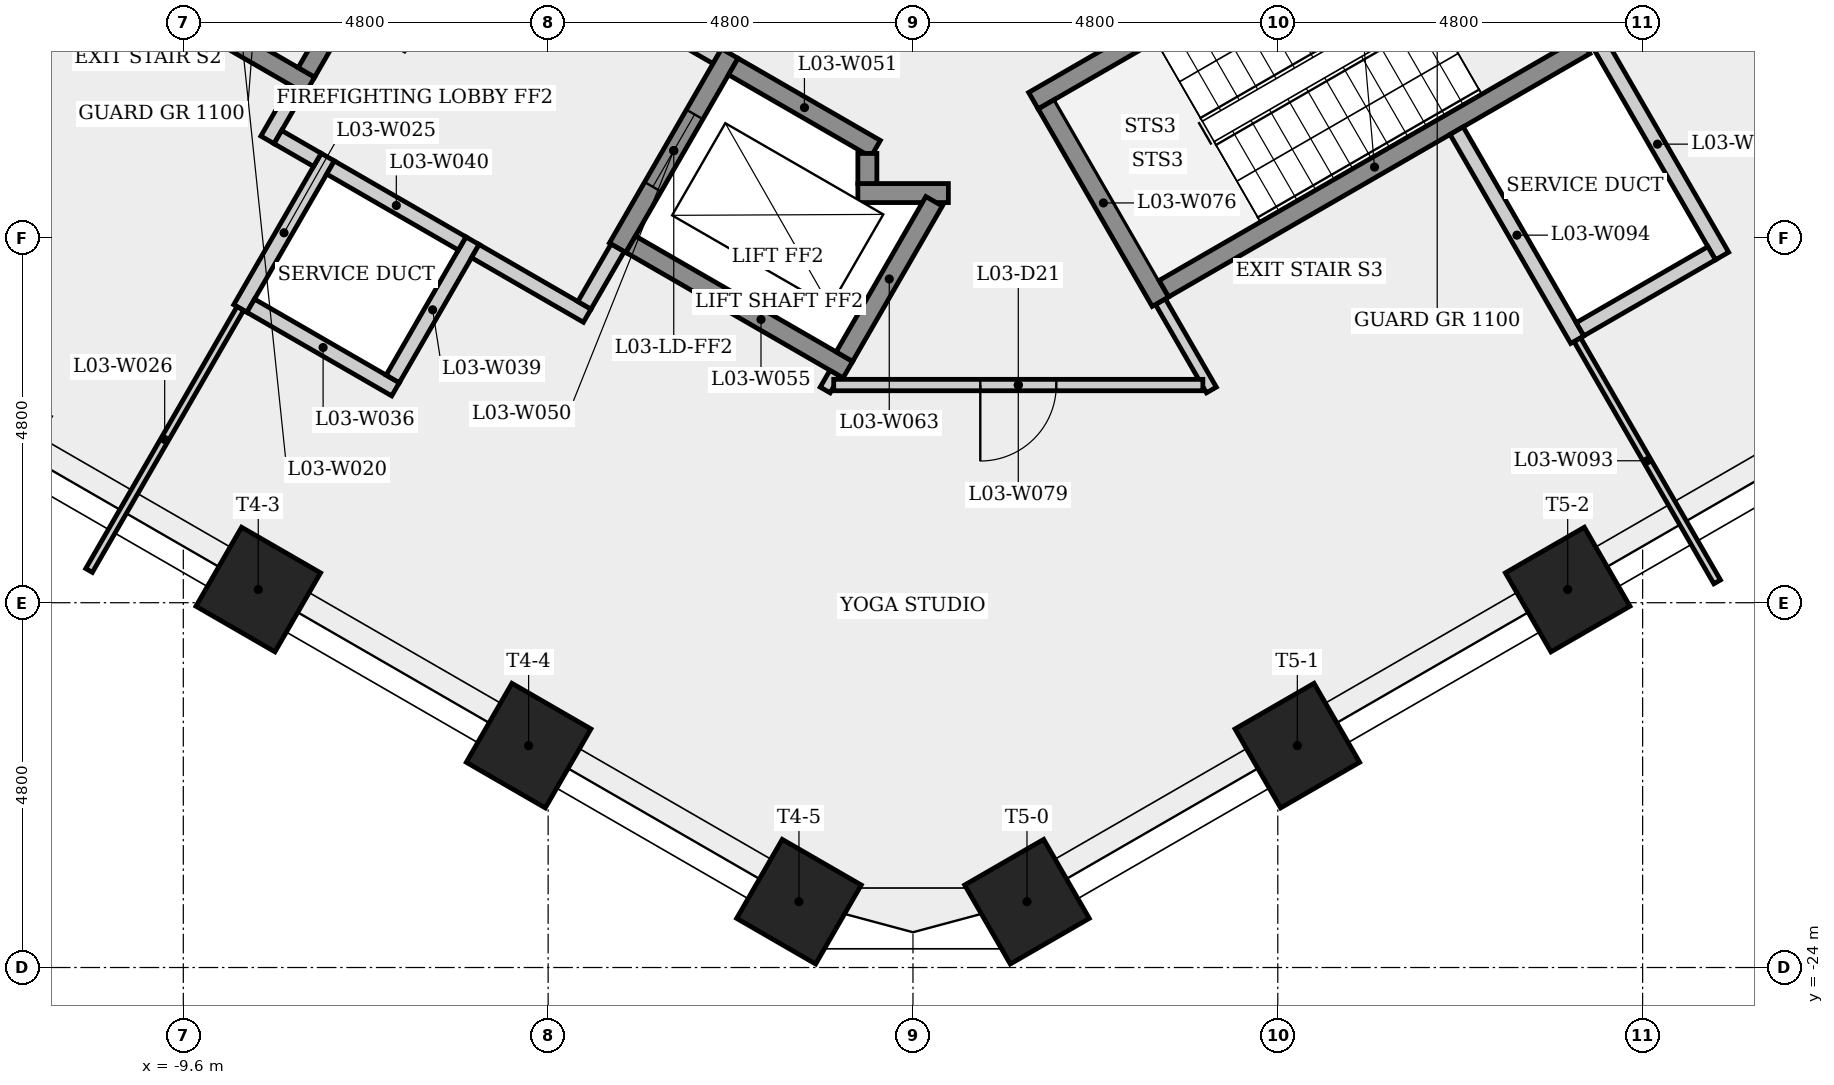
"""IFC4 building model, lengths in metres.
Left out: names, types, materials, properties, quantities, classifications, styles, units other than length and angle.
Written with IfcOpenShell. Run it as: python <this file> out.ifc"""

import sys

from ifc_helpers import new_model, si_unit, direction, frame, frame_2d, origin, origin_2d, place, context, subcontext, project, spatial, rectangle, extrude, element, fill, save


model = new_model("IFC4")
c1 = context("Model", 3, precision=1e-05, world=origin(), true_north=direction((0.0, 1.0)))
c2 = subcontext(c1, "Body", "Model", "MODEL_VIEW")
j1 = project(units=[si_unit("LENGTHUNIT", "METRE"), si_unit("PLANEANGLEUNIT", "RADIAN")], contexts=[c1])
p1 = place(None, origin())
s1 = spatial("IfcSite", under=j1, at=p1, CompositionType="ELEMENT")
p2 = place(p1, origin())
s2 = spatial("IfcBuilding", under=s1, at=p2, CompositionType="ELEMENT")
p3 = place(p2, frame((0.0, 0.0, 16.0)))
s3 = spatial("IfcBuildingStorey", under=s2, at=p3, CompositionType="ELEMENT", Elevation=16.0)
for number, where, z_axis, x_axis in (
    (1, (-8.614, -19.027, 0.0), (0.0, 0.0, 1.0), (-0.5, -0.866, 0.0)),
    (2, (-5.057, -21.08, 0.0), (0.0, 0.0, 1.0), (-0.5, -0.866, 0.0)),
    (3, (-1.5, -23.134, 0.0), (0.0, 0.0, 1.0), (-0.5, -0.866, 0.0)),
    (4, (1.5, -23.134, 0.0), (0.0, 0.0, 1.0), (0.5, -0.866, 0.0)),
    (5, (5.057, -21.08, 0.0), (0.0, 0.0, 1.0), (0.5, -0.866, 0.0)),
    (6, (8.614, -19.027, 0.0), (0.0, 0.0, 1.0), (0.5, -0.866, 0.0)),
):
    element("IfcColumn", number, at=place(p3, frame(where, z_axis=z_axis, x_axis=x_axis)), inside=s3, PredefinedType="COLUMN", context=c2, shape_type="SweptSolid", body=[
        extrude(rectangle(XDim=1.2, YDim=1.2, at=origin_2d()), origin(), (0.0, 0.0, 1.0), 4.5),
    ])
p4 = place(p3, frame((-8.85, -15.329, 0.0), z_axis=(0.0, 0.0, 1.0), x_axis=(0.500077740698, 0.865980515519, 0.0)))
e7 = element("IfcWall", 7, at=p4, inside=s3, PredefinedType="PLUMBINGWALL", context=c2, shape_type="SweptSolid", body=[
    extrude(rectangle(XDim=2.3, YDim=0.2, at=frame_2d((1.15, 0.0))), origin(), (0.0, 0.0, 1.0), 4.05),
])
p5 = place(p3, frame((-8.85, -15.329, 0.0), z_axis=(0.0, 0.0, 1.0), x_axis=(-0.499991453095, -0.866030338286, 0.0)))
e8 = element("IfcWall", 8, at=p5, inside=s3, PredefinedType="PARTITIONING", context=c2, shape_type="SweptSolid", body=[
    extrude(rectangle(XDim=3.98, YDim=0.1, at=frame_2d((1.99, 0.0))), origin(), (0.0, 0.0, 1.0), 4.05),
])
p6 = place(p3, frame((-8.493, -13.11, 0.0), z_axis=(0.0, 0.0, 1.0), x_axis=(0.500067724834, 0.865986299303, 0.0)))
e9 = element("IfcWall", 9, at=p6, inside=s3, PredefinedType="PARTITIONING", context=c2, shape_type="SweptSolid", body=[
    extrude(rectangle(XDim=0.775, YDim=0.2, at=frame_2d((0.388, 0.0))), origin(), (0.0, 0.0, 1.0), 4.05),
])
p7 = place(p3, frame((-7.935, -12.393, 0.0), z_axis=(0.0, 0.0, 1.0), x_axis=(-0.866025499775, 0.499999833739, 0.0)))
e10 = element("IfcWall", 10, at=p7, inside=s3, PredefinedType="SHEAR", context=c2, shape_type="SweptSolid", body=[
    extrude(rectangle(XDim=6.4, YDim=0.25, at=frame_2d((3.2, 0.0))), origin(), (0.0, 0.0, 1.0), 4.05),
])
p8 = place(p3, frame((-7.836, -13.373, 0.0), z_axis=(0.0, 0.0, 1.0), x_axis=(-0.866232998003, 0.499640263761, 0.0)))
e11 = element("IfcWall", 11, at=p8, inside=s3, PredefinedType="PARTITIONING", context=c2, shape_type="SweptSolid", body=[
    extrude(rectangle(XDim=0.6, YDim=0.2, at=frame_2d((0.3, 0.0))), origin(), (0.0, 0.0, 1.0), 4.05),
])
p9 = place(p3, frame((-6.808, -16.392, 0.0), z_axis=(0.0, 0.0, 1.0), x_axis=(-0.866008176907, 0.50002983664, 0.0)))
e12 = element("IfcWall", 12, at=p9, inside=s3, PredefinedType="PLUMBINGWALL", context=c2, shape_type="SweptSolid", body=[
    extrude(rectangle(XDim=2.2, YDim=0.2, at=frame_2d((1.1, 0.0))), origin(), (0.0, 0.0, 1.0), 4.05),
])
p10 = place(p3, frame((-6.605, -9.841, 0.0), z_axis=(0.0, 0.0, 1.0), x_axis=(-0.499996545922, -0.866027397988, 0.0)))
e13 = element("IfcWall", 13, at=p10, inside=s3, PredefinedType="SHEAR", context=c2, shape_type="SweptSolid", body=[
    extrude(rectangle(XDim=2.75, YDim=0.25, at=frame_2d((1.375, 0.0))), origin(), (0.0, 0.0, 1.0), 4.05),
])
p11 = place(p10, frame((0.875, 0.0, 0.0)))
e14 = element("IfcOpeningElement", 14, at=p11, cuts=e13, PredefinedType="OPENING", context=c2, shape_type="SweptSolid", body=[
    extrude(rectangle(XDim=1.0, YDim=2.1, at=frame_2d((0.5, 1.05))), frame((0.0, 0.135, 0.0), z_axis=(0.0, -1.0, 0.0), x_axis=(1.0, 0.0, 0.0)), (0.0, 0.0, 1.0), 0.27),
])
p12 = place(p3, frame((-6.435, -9.795, 0.0), z_axis=(0.0, 0.0, 1.0), x_axis=(0.866012907634, -0.500021643343, 0.0)))
e15 = element("IfcWall", 15, at=p12, inside=s3, PredefinedType="PARTITIONING", context=c2, shape_type="SweptSolid", body=[
    extrude(rectangle(XDim=4.45, YDim=0.2, at=frame_2d((2.225, 0.0))), origin(), (0.0, 0.0, 1.0), 4.05),
])
p13 = place(p12, frame((1.675, 0.0, 0.0)))
e16 = element("IfcOpeningElement", 16, at=p13, cuts=e15, PredefinedType="OPENING", context=c2, shape_type="SweptSolid", body=[
    extrude(rectangle(XDim=1.1, YDim=2.1, at=frame_2d((0.55, 1.05))), frame((0.0, 0.11, 0.0), z_axis=(0.0, -1.0, 0.0), x_axis=(1.0, 0.0, 0.0)), (0.0, 0.0, 1.0), 0.22),
])
p14 = place(p3, frame((-5.795, -14.437, 0.0), z_axis=(0.0, 0.0, 1.0), x_axis=(-0.500027713859, -0.866009402589, 0.0)))
e17 = element("IfcWall", 17, at=p14, inside=s3, PredefinedType="PLUMBINGWALL", context=c2, shape_type="SweptSolid", body=[
    extrude(rectangle(XDim=2.1, YDim=0.2, at=frame_2d((1.05, 0.0))), origin(), (0.0, 0.0, 1.0), 4.05),
])
p15 = place(p3, frame((-5.931, -14.473, 0.0), z_axis=(0.0, 0.0, 1.0), x_axis=(-0.866041268327, 0.499972520799, 0.0)))
e18 = element("IfcWall", 18, at=p15, inside=s3, PredefinedType="PLUMBINGWALL", context=c2, shape_type="SweptSolid", body=[
    extrude(rectangle(XDim=2.0, YDim=0.2, at=frame_2d((1.0, 0.0))), origin(), (0.0, 0.0, 1.0), 4.05),
])
p16 = place(p3, frame((-4.286, -15.423, 0.0), z_axis=(0.0, 0.0, 1.0), x_axis=(-0.866025371046, 0.500000056704, 0.0)))
e19 = element("IfcWall", 19, at=p16, inside=s3, PredefinedType="PARTITIONING", context=c2, shape_type="SweptSolid", body=[
    extrude(rectangle(XDim=1.7, YDim=0.2, at=frame_2d((0.85, 0.0))), origin(), (0.0, 0.0, 1.0), 4.05),
])
p17 = place(p3, frame((-3.885, -14.529, 0.0), z_axis=(0.0, 0.0, 1.0), x_axis=(-0.499859285417, -0.866106630146, 0.0)))
e20 = element("IfcWall", 20, at=p17, inside=s3, PredefinedType="PARTITIONING", context=c2, shape_type="SweptSolid", body=[
    extrude(rectangle(XDim=0.875, YDim=0.2, at=frame_2d((0.438, 0.0))), origin(), (0.0, 0.0, 1.0), 4.05),
])
p18 = place(p3, frame((-2.41, -11.974, 0.0), z_axis=(0.0, 0.0, 1.0), x_axis=(-0.500001826776, -0.866024349092, 0.0)))
e21 = element("IfcWall", 21, at=p18, inside=s3, PredefinedType="SHEAR", context=c2, shape_type="SweptSolid", body=[
    extrude(rectangle(XDim=2.95, YDim=0.25, at=frame_2d((1.475, 0.0))), origin(), (0.0, 0.0, 1.0), 4.05),
])
p19 = place(p18, frame((0.925, 0.0, 0.0)))
e22 = element("IfcOpeningElement", 22, at=p19, cuts=e21, PredefinedType="OPENING", context=c2, shape_type="SweptSolid", body=[
    extrude(rectangle(XDim=1.1, YDim=2.1, at=frame_2d((0.55, 1.05))), frame((0.0, 0.135, 0.0), z_axis=(0.0, -1.0, 0.0), x_axis=(1.0, 0.0, 0.0)), (0.0, 0.0, 1.0), 0.27),
])
p20 = place(p3, frame((-2.364, -12.145, 0.0), z_axis=(0.0, 0.0, 1.0), x_axis=(0.86603892542, -0.499976579108, 0.0)))
e23 = element("IfcWall", 23, at=p20, inside=s3, PredefinedType="SHEAR", context=c2, shape_type="SweptSolid", body=[
    extrude(rectangle(XDim=2.162, YDim=0.25, at=frame_2d((1.081, 0.0))), origin(), (0.0, 0.0, 1.0), 4.05),
])
p21 = place(p3, frame((-1.155, -16.401, 0.0), z_axis=(0.0, 0.0, 1.0), x_axis=(0.500134748329, 0.865947592822, 0.0)))
e24 = element("IfcWall", 24, at=p21, inside=s3, PredefinedType="PARTITIONING", context=c2, shape_type="SweptSolid", body=[
    extrude(rectangle(XDim=0.256, YDim=0.15, at=frame_2d((0.128, 0.0))), origin(), (0.0, 0.0, 1.0), 4.05),
])
p22 = place(p3, frame((-0.856, -16.133, 0.0), z_axis=(0.0, 0.0, 1.0), x_axis=(-0.866021716278, 0.500006386895, 0.0)))
e25 = element("IfcWall", 25, at=p22, inside=s3, PredefinedType="SHEAR", context=c2, shape_type="SweptSolid", body=[
    extrude(rectangle(XDim=3.3, YDim=0.25, at=frame_2d((1.65, 0.0))), origin(), (0.0, 0.0, 1.0), 4.05),
])
p23 = place(p3, frame((-0.725, -13.81, 0.0), z_axis=(0.0, 0.0, 1.0), x_axis=(1.0, 0.0, 0.0)))
e26 = element("IfcWall", 26, at=p23, inside=s3, PredefinedType="SHEAR", context=c2, shape_type="SweptSolid", body=[
    extrude(rectangle(XDim=1.191, YDim=0.25, at=frame_2d((0.595, 0.0))), origin(), (0.0, 0.0, 1.0), 4.05),
])
p24 = place(p3, frame((-0.6, -13.289, 0.0), z_axis=(0.0, 0.0, 1.0), x_axis=(0.0, -1.0, 0.0)))
e27 = element("IfcWall", 27, at=p24, inside=s3, PredefinedType="SHEAR", context=c2, shape_type="SweptSolid", body=[
    extrude(rectangle(XDim=0.396, YDim=0.25, at=frame_2d((0.198, 0.0))), origin(), (0.0, 0.0, 1.0), 4.5),
])
p25 = place(p3, frame((0.278, -13.918, 0.0), z_axis=(0.0, 0.0, 1.0), x_axis=(-0.49998806882, -0.866032292145, 0.0)))
e28 = element("IfcWall", 28, at=p25, inside=s3, PredefinedType="SHEAR", context=c2, shape_type="SweptSolid", body=[
    extrude(rectangle(XDim=2.36, YDim=0.25, at=frame_2d((1.18, 0.0))), origin(), (0.0, 0.0, 1.0), 4.5),
])
p26 = place(p3, frame((1.585, -12.595, 0.0), z_axis=(0.0, 0.0, 1.0), x_axis=(0.866036417653, 0.499980922934, 0.0)))
e29 = element("IfcWall", 29, at=p26, inside=s3, PredefinedType="SHEAR", context=c2, shape_type="SweptSolid", body=[
    extrude(rectangle(XDim=6.65, YDim=0.25, at=frame_2d((3.325, 0.0))), origin(), (0.0, 0.0, 1.0), 4.05),
])
p27 = place(p26, frame((5.275, 0.0, 0.0)))
e30 = element("IfcOpeningElement", 30, at=p27, cuts=e29, PredefinedType="OPENING", context=c2, shape_type="SweptSolid", body=[
    extrude(rectangle(XDim=1.0, YDim=2.1, at=frame_2d((0.5, 1.05))), frame((0.0, 0.135, 0.0), z_axis=(0.0, -1.0, 0.0), x_axis=(1.0, 0.0, 0.0)), (0.0, 0.0, 1.0), 0.27),
])
p28 = place(p3, frame((3.256, -15.239, 0.0), z_axis=(0.0, 0.0, 1.0), x_axis=(0.499974444137, -0.866040157966, 0.0)))
e31 = element("IfcWall", 31, at=p28, inside=s3, PredefinedType="PARTITIONING", context=c2, shape_type="SweptSolid", body=[
    extrude(rectangle(XDim=1.342, YDim=0.15, at=frame_2d((0.671, 0.0))), origin(), (0.0, 0.0, 1.0), 4.05),
])
p29 = place(p3, frame((3.256, -15.239, 0.0), z_axis=(0.0, 0.0, 1.0), x_axis=(-0.50002537861, 0.866010750942, 0.0)))
e32 = element("IfcWall", 32, at=p29, inside=s3, PredefinedType="SHEAR", context=c2, shape_type="SweptSolid", body=[
    extrude(rectangle(XDim=3.0, YDim=0.25, at=frame_2d((1.5, 0.0))), origin(), (0.0, 0.0, 1.0), 4.05),
])
p30 = place(p3, frame((3.814, -16.336, 0.0), z_axis=(0.0, 0.0, 1.0), x_axis=(-1.0, 0.0, 0.0)))
e33 = element("IfcWall", 33, at=p30, inside=s3, PredefinedType="PARTITIONING", context=c2, shape_type="SweptSolid", body=[
    extrude(rectangle(XDim=4.857, YDim=0.15, at=frame_2d((2.428, 0.0))), origin(), (0.0, 0.0, 1.0), 4.05),
])
p31 = place(p30, frame((1.928, 0.0, 0.0)))
e34 = element("IfcOpeningElement", 34, at=p31, cuts=e33, PredefinedType="OPENING", context=c2, shape_type="SweptSolid", body=[
    extrude(rectangle(XDim=1.0, YDim=2.1, at=frame_2d((0.5, 1.05))), frame((0.0, 0.085, 0.0), z_axis=(0.0, -1.0, 0.0), x_axis=(1.0, 0.0, 0.0)), (0.0, 0.0, 1.0), 0.17),
])
p32 = place(p3, frame((3.301, -15.068, 0.0), z_axis=(0.0, 0.0, 1.0), x_axis=(0.866035036182, 0.499983315828, 0.0)))
e35 = element("IfcWall", 35, at=p32, inside=s3, PredefinedType="SHEAR", context=c2, shape_type="SweptSolid", body=[
    extrude(rectangle(XDim=6.4, YDim=0.25, at=frame_2d((3.2, 0.0))), origin(), (0.0, 0.0, 1.0), 4.05),
])
p33 = place(p3, frame((8.74, -15.738, 0.0), z_axis=(0.0, 0.0, 1.0), x_axis=(0.500026738915, -0.866009965514, 0.0)))
e36 = element("IfcWall", 36, at=p33, inside=s3, PredefinedType="PARTITIONING", context=c2, shape_type="SweptSolid", body=[
    extrude(rectangle(XDim=3.681, YDim=0.1, at=frame_2d((1.84, 0.0))), origin(), (0.0, 0.0, 1.0), 4.05),
])
p34 = place(p3, frame((8.74, -15.739, 0.0), z_axis=(0.0, 0.0, 1.0), x_axis=(-0.500017526161, 0.866015284814, 0.0)))
e37 = element("IfcWall", 37, at=p34, inside=s3, PredefinedType="PLUMBINGWALL", context=c2, shape_type="SweptSolid", body=[
    extrude(rectangle(XDim=3.175, YDim=0.2, at=frame_2d((1.588, 0.0))), origin(), (0.0, 0.0, 1.0), 4.05),
])
p35 = place(p3, frame((8.945, -11.694, 0.0), z_axis=(0.0, 0.0, 1.0), x_axis=(0.500062241894, -0.865989465428, 0.0)))
e38 = element("IfcWall", 38, at=p35, inside=s3, PredefinedType="PLUMBINGWALL", context=c2, shape_type="SweptSolid", body=[
    extrude(rectangle(XDim=3.4, YDim=0.2, at=frame_2d((1.7, 0.0))), origin(), (0.0, 0.0, 1.0), 4.05),
])
p36 = place(p3, frame((10.509, -14.602, 0.0), z_axis=(0.0, 0.0, 1.0), x_axis=(-0.866010750942, -0.50002537861, 0.0)))
e39 = element("IfcWall", 39, at=p36, inside=s3, PredefinedType="PLUMBINGWALL", context=c2, shape_type="SweptSolid", body=[
    extrude(rectangle(XDim=2.0, YDim=0.2, at=frame_2d((1.0, 0.0))), origin(), (0.0, 0.0, 1.0), 4.05),
])
p37 = place(p3, frame((12.587, -13.401, 0.0), z_axis=(0.0, 0.0, 1.0), x_axis=(-0.499952049853, 0.866053086045, 0.0)))
e40 = element("IfcWall", 40, at=p37, inside=s3, PredefinedType="PARTITIONING", context=c2, shape_type="SweptSolid", body=[
    extrude(rectangle(XDim=3.099, YDim=0.15, at=frame_2d((1.549, 0.0))), origin(), (0.0, 0.0, 1.0), 4.05),
])
p38 = place(p19, origin())
e41 = element("IfcDoor", 41, at=p38, inside=s3, OperationType="SLIDING_TO_LEFT", PredefinedType="DOOR", context=c2, shape_type="SweptSolid", body=[
    extrude(rectangle(XDim=1.1, YDim=2.1, at=frame_2d((0.55, 1.05))), frame((0.0, 0.025, 0.0), z_axis=(0.0, -1.0, 0.0), x_axis=(1.0, 0.0, 0.0)), (0.0, 0.0, 1.0), 0.05),
])
fill(e22, e41)
p39 = place(p31, origin())
e42 = element("IfcDoor", 42, at=p39, inside=s3, OperationType="SINGLE_SWING_RIGHT", PredefinedType="DOOR", context=c2, shape_type="SweptSolid", body=[
    extrude(rectangle(XDim=1.0, YDim=2.1, at=frame_2d((0.5, 1.05))), frame((0.0, 0.025, 0.0), z_axis=(0.0, -1.0, 0.0), x_axis=(1.0, 0.0, 0.0)), (0.0, 0.0, 1.0), 0.05),
])
fill(e34, e42)
save(model, sys.argv[1])
